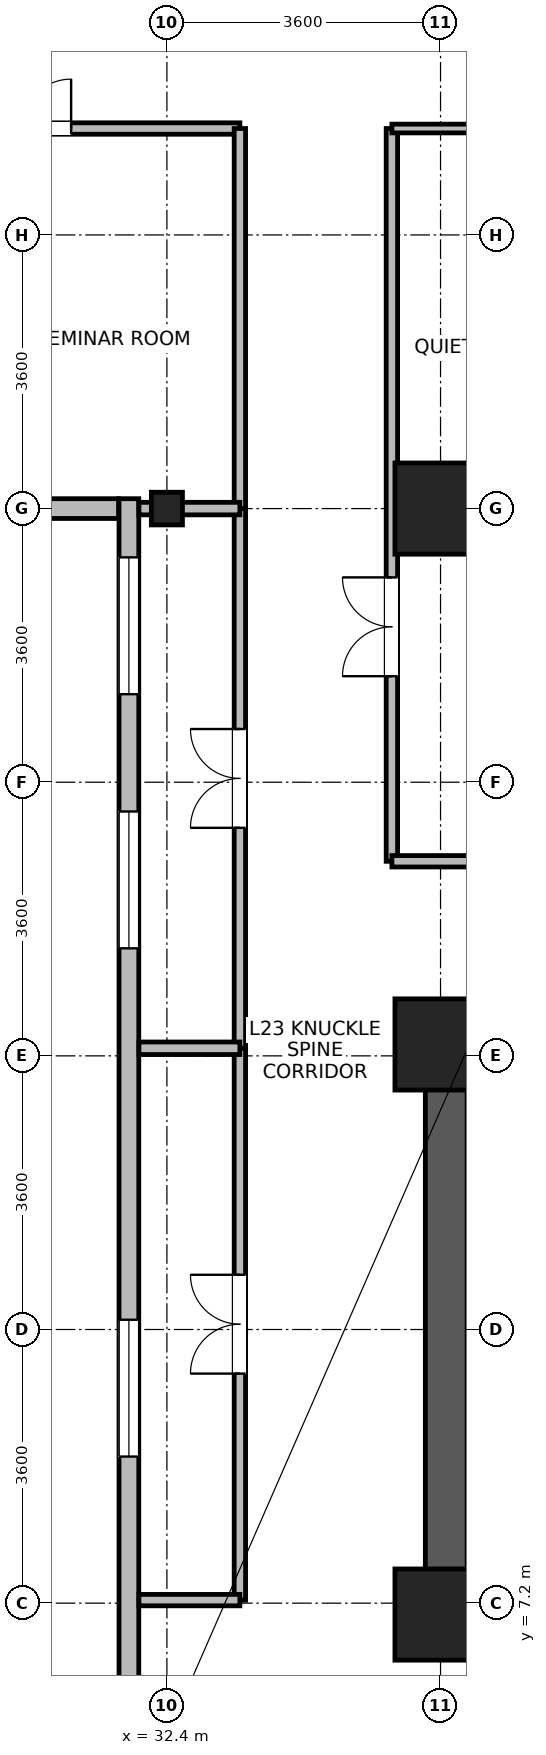
"""IFC4 building model, lengths in metres.
Left out: names, types, materials, properties, quantities, classifications, styles, units other than length and angle.
Written with IfcOpenShell. Run it as: python <this file> out.ifc"""

import sys

from ifc_helpers import new_model, si_unit, direction, frame, frame_2d, origin, origin_2d, place, context, subcontext, project, spatial, rectangle, i_section, extrude, source, transform, mapped, element, fill, save


model = new_model("IFC4")
c1 = context("Model", 3, precision=1e-05, world=origin(), true_north=direction((0.0, 1.0)))
c2 = subcontext(c1, "Body", "Model", "MODEL_VIEW")
j1 = project(units=[si_unit("LENGTHUNIT", "METRE"), si_unit("PLANEANGLEUNIT", "RADIAN")], contexts=[c1])
p1 = place(None, origin())
s1 = spatial("IfcSite", under=j1, at=p1, CompositionType="ELEMENT")
p2 = place(p1, origin())
s2 = spatial("IfcBuilding", under=s1, at=p2, CompositionType="ELEMENT")
p3 = place(p2, frame((0.0, 0.0, 93.4)))
s3 = spatial("IfcBuildingStorey", under=s2, at=p3, CompositionType="ELEMENT", Elevation=93.4)
p4 = place(p3, frame((36.075, 6.75, 0.0), z_axis=(0.0, 0.0, 1.0), x_axis=(0.0, 1.0, 0.0)))
e1 = element("IfcWall", 1, at=p4, inside=s3, PredefinedType="SHEAR", context=c2, shape_type="SweptSolid", body=[
    extrude(rectangle(XDim=8.1, YDim=0.55, at=frame_2d((4.05, 0.0))), origin(), (0.0, 0.0, 1.0), 3.45),
])
m1 = source(origin(), c2, "Body", "SweptSolid", [
    extrude(rectangle(XDim=1.2, YDim=1.2, at=origin_2d()), origin(), (0.0, 0.0, 1.0), 3.7),
])
for number, where, z_axis, x_axis in (
    (2, (36.0, 21.6, 0.0), (0.0, 0.0, 1.0), (1.0, 0.0, 0.0)),
    (3, (36.0, 7.05, 0.0), (0.0, 0.0, 1.0), (1.0, 0.0, 0.0)),
    (4, (36.0, 14.55, 0.0), (0.0, 0.0, 1.0), (1.0, 0.0, 0.0)),
):
    element("IfcColumn", number, at=place(p3, frame(where, z_axis=z_axis, x_axis=x_axis)), inside=s3, PredefinedType="COLUMN", context=c2, shape_type="MappedRepresentation", body=[
        mapped(m1, transform((0.0, 0.0, 0.0), x_axis=(1.0, 0.0, 0.0), y_axis=(0.0, 1.0, 0.0), z_axis=(0.0, 0.0, 1.0), scale=1.0)),
    ])
m2 = source(origin(), c2, "Body", "SweptSolid", [
    extrude(i_section(OverallWidth=0.409, OverallDepth=0.43, WebThickness=0.024, FlangeThickness=0.033, FilletRadius=0.015, at=origin_2d()), origin(), (0.0, 0.0, 1.0), 3.7),
])
p5 = place(p3, frame((32.4, 21.6, 0.0), z_axis=(0.0, 0.0, 1.0), x_axis=(1.0, 0.0, 0.0)))
e5 = element("IfcColumn", 5, at=p5, inside=s3, PredefinedType="COLUMN", context=c2, shape_type="MappedRepresentation", body=[
    mapped(m2, transform((0.0, 0.0, 0.0), x_axis=(1.0, 0.0, 0.0), y_axis=(0.0, 1.0, 0.0), z_axis=(0.0, 0.0, 1.0), scale=1.0)),
])
p6 = place(p3, frame((31.765, 21.6, 0.0), z_axis=(0.0, 0.0, 1.0), x_axis=(-1.0, 0.0, 0.0)))
e6 = element("IfcWall", 6, at=p6, inside=s3, PredefinedType="STANDARD", context=c2, shape_type="SweptSolid", body=[
    extrude(rectangle(XDim=2.364, YDim=0.26, at=frame_2d((1.182, 0.0))), origin(), (0.0, 0.0, 1.0), 2.93),
])
p7 = place(p3, frame((31.9, 1.67, 0.0), z_axis=(0.0, 0.0, 1.0), x_axis=(0.0, 1.0, 0.0)))
e7 = element("IfcWall", 7, at=p7, inside=s3, PredefinedType="STANDARD", context=c2, shape_type="SweptSolid", body=[
    extrude(rectangle(XDim=20.06, YDim=0.26, at=frame_2d((10.03, 0.0))), origin(), (0.0, 0.0, 1.0), 3.43),
])
p8 = place(p7, frame((0.772, 0.0, 0.85)))
e8 = element("IfcOpeningElement", 8, at=p8, cuts=e7, PredefinedType="OPENING", context=c2, shape_type="SweptSolid", body=[
    extrude(rectangle(XDim=1.8, YDim=1.85, at=frame_2d((0.9, 0.925))), frame((0.0, 0.14, 0.0), z_axis=(0.0, -1.0, 0.0), x_axis=(1.0, 0.0, 0.0)), (0.0, 0.0, 1.0), 0.28),
])
p9 = place(p7, frame((7.458, 0.0, 0.85)))
e9 = element("IfcOpeningElement", 9, at=p9, cuts=e7, PredefinedType="OPENING", context=c2, shape_type="SweptSolid", body=[
    extrude(rectangle(XDim=1.8, YDim=1.85, at=frame_2d((0.9, 0.925))), frame((0.0, 0.14, 0.0), z_axis=(0.0, -1.0, 0.0), x_axis=(1.0, 0.0, 0.0)), (0.0, 0.0, 1.0), 0.28),
])
p10 = place(p7, frame((14.145, 0.0, 0.85)))
e10 = element("IfcOpeningElement", 10, at=p10, cuts=e7, PredefinedType="OPENING", context=c2, shape_type="SweptSolid", body=[
    extrude(rectangle(XDim=1.8, YDim=1.85, at=frame_2d((0.9, 0.925))), frame((0.0, 0.14, 0.0), z_axis=(0.0, -1.0, 0.0), x_axis=(1.0, 0.0, 0.0)), (0.0, 0.0, 1.0), 0.28),
])
p11 = place(p7, frame((17.488, 0.0, 0.85)))
e11 = element("IfcOpeningElement", 11, at=p11, cuts=e7, PredefinedType="OPENING", context=c2, shape_type="SweptSolid", body=[
    extrude(rectangle(XDim=1.8, YDim=1.85, at=frame_2d((0.9, 0.925))), frame((0.0, 0.14, 0.0), z_axis=(0.0, -1.0, 0.0), x_axis=(1.0, 0.0, 0.0)), (0.0, 0.0, 1.0), 0.28),
])
p12 = place(p3, frame((35.36, 16.96, 0.0), z_axis=(0.0, 0.0, 1.0), x_axis=(0.0, 1.0, 0.0)))
e12 = element("IfcWall", 12, at=p12, inside=s3, PredefinedType="PARTITIONING", context=c2, shape_type="SweptSolid", body=[
    extrude(rectangle(XDim=9.64, YDim=0.15, at=frame_2d((4.82, 0.0))), origin(), (0.0, 0.0, 1.0), 3.43),
])
p13 = place(p12, frame((2.435, 0.0, 0.0)))
e13 = element("IfcOpeningElement", 13, at=p13, cuts=e12, PredefinedType="OPENING", context=c2, shape_type="SweptSolid", body=[
    extrude(rectangle(XDim=1.3, YDim=2.12, at=frame_2d((0.65, 1.06))), frame((0.0, 0.085, 0.0), z_axis=(0.0, -1.0, 0.0), x_axis=(1.0, 0.0, 0.0)), (0.0, 0.0, 1.0), 0.17),
])
p14 = place(p3, frame((33.36, 7.24, 0.0), z_axis=(0.0, 0.0, 1.0), x_axis=(0.0, 1.0, 0.0)))
e14 = element("IfcWall", 14, at=p14, inside=s3, PredefinedType="PARTITIONING", context=c2, shape_type="SweptSolid", body=[
    extrude(rectangle(XDim=7.26, YDim=0.15, at=frame_2d((3.63, 0.0))), origin(), (0.0, 0.0, 1.0), 3.43),
])
p15 = place(p14, frame((2.98, 0.0, 0.0)))
e15 = element("IfcOpeningElement", 15, at=p15, cuts=e14, PredefinedType="OPENING", context=c2, shape_type="SweptSolid", body=[
    extrude(rectangle(XDim=1.3, YDim=2.12, at=frame_2d((0.65, 1.06))), frame((0.0, 0.085, 0.0), z_axis=(0.0, -1.0, 0.0), x_axis=(1.0, 0.0, 0.0)), (0.0, 0.0, 1.0), 0.17),
])
p16 = place(p3, frame((33.36, 14.5, 0.0), z_axis=(0.0, 0.0, 1.0), x_axis=(0.0, 1.0, 0.0)))
e16 = element("IfcWall", 16, at=p16, inside=s3, PredefinedType="PARTITIONING", context=c2, shape_type="SweptSolid", body=[
    extrude(rectangle(XDim=7.1, YDim=0.15, at=frame_2d((3.55, 0.0))), origin(), (0.0, 0.0, 1.0), 3.43),
])
p17 = place(p16, frame((2.9, 0.0, 0.0)))
e17 = element("IfcOpeningElement", 17, at=p17, cuts=e16, PredefinedType="OPENING", context=c2, shape_type="SweptSolid", body=[
    extrude(rectangle(XDim=1.3, YDim=2.12, at=frame_2d((0.65, 1.06))), frame((0.0, 0.085, 0.0), z_axis=(0.0, -1.0, 0.0), x_axis=(1.0, 0.0, 0.0)), (0.0, 0.0, 1.0), 0.17),
])
p18 = place(p3, frame((27.62, 26.6, 0.0), z_axis=(0.0, 0.0, 1.0), x_axis=(1.0, 0.0, 0.0)))
e18 = element("IfcWall", 18, at=p18, inside=s3, PredefinedType="PARTITIONING", context=c2, shape_type="SweptSolid", body=[
    extrude(rectangle(XDim=5.74, YDim=0.15, at=frame_2d((2.87, 0.0))), origin(), (0.0, 0.0, 1.0), 3.43),
])
p19 = place(p18, frame((2.22, 0.0, 0.0)))
e19 = element("IfcOpeningElement", 19, at=p19, cuts=e18, PredefinedType="OPENING", context=c2, shape_type="SweptSolid", body=[
    extrude(rectangle(XDim=1.3, YDim=2.12, at=frame_2d((0.65, 1.06))), frame((0.0, 0.085, 0.0), z_axis=(0.0, -1.0, 0.0), x_axis=(1.0, 0.0, 0.0)), (0.0, 0.0, 1.0), 0.17),
])
p20 = place(p3, frame((33.36, 21.6, 0.0), z_axis=(0.0, 0.0, 1.0), x_axis=(0.0, 1.0, 0.0)))
e20 = element("IfcWall", 20, at=p20, inside=s3, PredefinedType="PARTITIONING", context=c2, shape_type="SweptSolid", body=[
    extrude(rectangle(XDim=5.0, YDim=0.15, at=frame_2d((2.5, 0.0))), origin(), (0.0, 0.0, 1.0), 3.43),
])
p21 = place(p3, frame((35.36, 16.96, 0.0), z_axis=(0.0, 0.0, 1.0), x_axis=(1.0, 0.0, 0.0)))
e21 = element("IfcWall", 21, at=p21, inside=s3, PredefinedType="PARTITIONING", context=c2, shape_type="SweptSolid", body=[
    extrude(rectangle(XDim=4.18, YDim=0.15, at=frame_2d((2.09, 0.0))), origin(), (0.0, 0.0, 1.0), 3.43),
])
p22 = place(p3, frame((32.032, 7.24, 0.0), z_axis=(0.0, 0.0, 1.0), x_axis=(1.0, 0.0, 0.0)))
e22 = element("IfcWall", 22, at=p22, inside=s3, PredefinedType="PARTITIONING", context=c2, shape_type="SweptSolid", body=[
    extrude(rectangle(XDim=1.328, YDim=0.15, at=frame_2d((0.664, 0.0))), origin(), (0.0, 0.0, 1.0), 3.43),
])
p23 = place(p3, frame((35.36, 26.6, 0.0), z_axis=(0.0, 0.0, 1.0), x_axis=(1.0, 0.0, 0.0)))
e23 = element("IfcWall", 23, at=p23, inside=s3, PredefinedType="PARTITIONING", context=c2, shape_type="SweptSolid", body=[
    extrude(rectangle(XDim=4.18, YDim=0.115, at=frame_2d((2.09, 0.0))), origin(), (0.0, 0.0, 1.0), 3.43),
])
p24 = place(p3, frame((32.032, 14.5, 0.0), z_axis=(0.0, 0.0, 1.0), x_axis=(1.0, 0.0, 0.0)))
e24 = element("IfcWall", 24, at=p24, inside=s3, PredefinedType="PARTITIONING", context=c2, shape_type="SweptSolid", body=[
    extrude(rectangle(XDim=1.328, YDim=0.165, at=frame_2d((0.664, 0.0))), origin(), (0.0, 0.0, 1.0), 3.43),
])
p25 = place(p3, frame((32.032, 21.6, 0.0), z_axis=(0.0, 0.0, 1.0), x_axis=(1.0, 0.0, 0.0)))
e25 = element("IfcWall", 25, at=p25, inside=s3, PredefinedType="PARTITIONING", context=c2, shape_type="SweptSolid", body=[
    extrude(rectangle(XDim=1.328, YDim=0.165, at=frame_2d((0.664, 0.0))), origin(), (0.0, 0.0, 1.0), 2.93),
])
p26 = place(p9, origin())
e26 = element("IfcWindow", 26, at=p26, inside=s3, PartitioningType="SINGLE_PANEL", PredefinedType="WINDOW", context=c2, shape_type="SweptSolid", body=[
    extrude(rectangle(XDim=1.8, YDim=1.85, at=frame_2d((0.9, 0.925))), frame((0.0, 0.03, 0.0), z_axis=(0.0, -1.0, 0.0), x_axis=(1.0, 0.0, 0.0)), (0.0, 0.0, 1.0), 0.06),
])
fill(e9, e26)
p27 = place(p10, origin())
e27 = element("IfcWindow", 27, at=p27, inside=s3, PartitioningType="SINGLE_PANEL", PredefinedType="WINDOW", context=c2, shape_type="SweptSolid", body=[
    extrude(rectangle(XDim=1.8, YDim=1.85, at=frame_2d((0.9, 0.925))), frame((0.0, 0.03, 0.0), z_axis=(0.0, -1.0, 0.0), x_axis=(1.0, 0.0, 0.0)), (0.0, 0.0, 1.0), 0.06),
])
fill(e10, e27)
p28 = place(p11, origin())
e28 = element("IfcWindow", 28, at=p28, inside=s3, PartitioningType="SINGLE_PANEL", PredefinedType="WINDOW", context=c2, shape_type="SweptSolid", body=[
    extrude(rectangle(XDim=1.8, YDim=1.85, at=frame_2d((0.9, 0.925))), frame((0.0, 0.03, 0.0), z_axis=(0.0, -1.0, 0.0), x_axis=(1.0, 0.0, 0.0)), (0.0, 0.0, 1.0), 0.06),
])
fill(e11, e28)
p29 = place(p13, origin())
e29 = element("IfcDoor", 29, at=p29, inside=s3, OperationType="DOUBLE_DOOR_SINGLE_SWING", PredefinedType="DOOR", context=c2, shape_type="SweptSolid", body=[
    extrude(rectangle(XDim=1.3, YDim=2.12, at=frame_2d((0.65, 1.06))), frame((0.0, 0.025, 0.0), z_axis=(0.0, -1.0, 0.0), x_axis=(1.0, 0.0, 0.0)), (0.0, 0.0, 1.0), 0.05),
])
fill(e13, e29)
p30 = place(p15, origin())
e30 = element("IfcDoor", 30, at=p30, inside=s3, OperationType="DOUBLE_DOOR_SINGLE_SWING", PredefinedType="DOOR", context=c2, shape_type="SweptSolid", body=[
    extrude(rectangle(XDim=1.3, YDim=2.12, at=frame_2d((0.65, 1.06))), frame((0.0, 0.025, 0.0), z_axis=(0.0, -1.0, 0.0), x_axis=(1.0, 0.0, 0.0)), (0.0, 0.0, 1.0), 0.05),
])
fill(e15, e30)
p31 = place(p17, origin())
e31 = element("IfcDoor", 31, at=p31, inside=s3, OperationType="DOUBLE_DOOR_SINGLE_SWING", PredefinedType="DOOR", context=c2, shape_type="SweptSolid", body=[
    extrude(rectangle(XDim=1.3, YDim=2.12, at=frame_2d((0.65, 1.06))), frame((0.0, 0.025, 0.0), z_axis=(0.0, -1.0, 0.0), x_axis=(1.0, 0.0, 0.0)), (0.0, 0.0, 1.0), 0.05),
])
fill(e17, e31)
p32 = place(p19, origin())
e32 = element("IfcDoor", 32, at=p32, inside=s3, OperationType="DOUBLE_DOOR_SINGLE_SWING", PredefinedType="DOOR", context=c2, shape_type="SweptSolid", body=[
    extrude(rectangle(XDim=1.3, YDim=2.12, at=frame_2d((0.65, 1.06))), frame((0.0, 0.025, 0.0), z_axis=(0.0, -1.0, 0.0), x_axis=(1.0, 0.0, 0.0)), (0.0, 0.0, 1.0), 0.05),
])
fill(e19, e32)
save(model, sys.argv[1])
